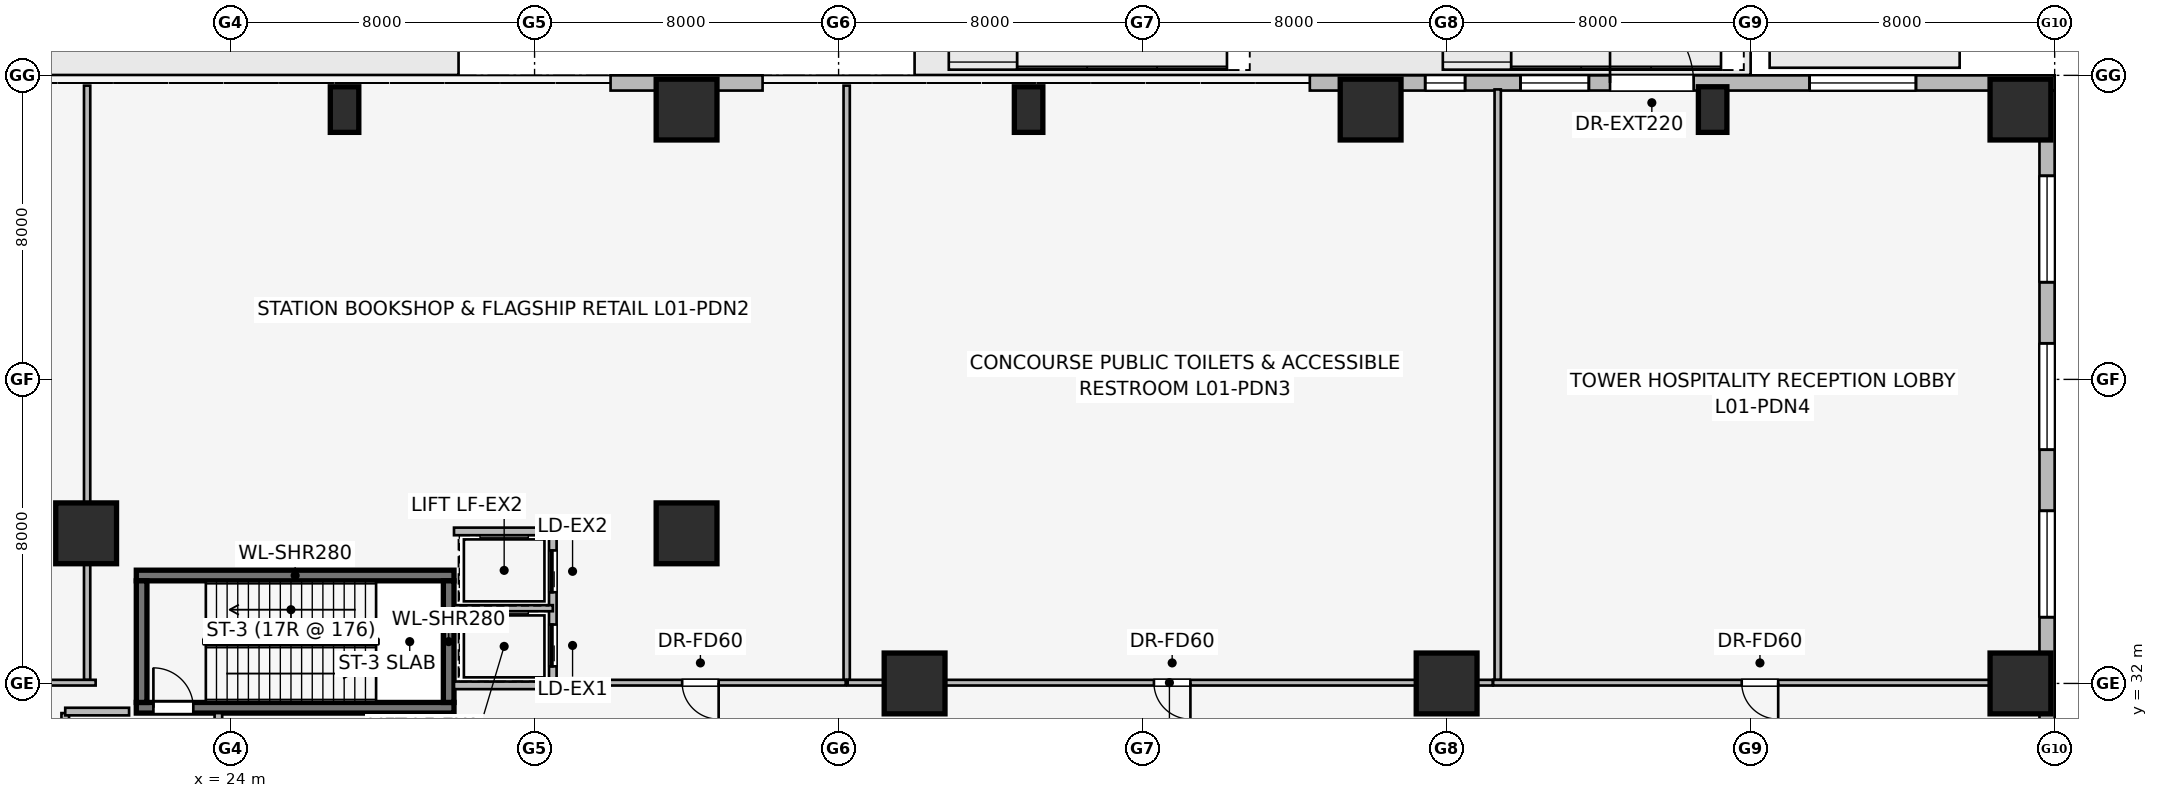
"""IFC4 building model, lengths in metres.
Left out: names, types, materials, properties, quantities, classifications, styles, units other than length and angle.
Written with IfcOpenShell. Run it as: python <this file> out.ifc"""

import sys

from ifc_helpers import new_model, si_unit, direction, frame, frame_2d, origin, origin_2d, place, context, subcontext, project, spatial, rectangle, extrude, element, fill, save


model = new_model("IFC4")
c1 = context("Model", 3, precision=1e-05, world=origin(), true_north=direction((0.0, 1.0)))
c2 = subcontext(c1, "Body", "Model", "MODEL_VIEW")
j1 = project(units=[si_unit("LENGTHUNIT", "METRE"), si_unit("PLANEANGLEUNIT", "RADIAN")], contexts=[c1])
p1 = place(None, origin())
s1 = spatial("IfcSite", under=j1, at=p1, CompositionType="ELEMENT")
p2 = place(p1, origin())
s2 = spatial("IfcBuilding", under=s1, at=p2, CompositionType="ELEMENT")
p3 = place(p2, origin())
s3 = spatial("IfcBuildingStorey", under=s2, at=p3, CompositionType="ELEMENT", Elevation=0.0)
p4 = place(p3, frame((21.52, 31.36, 0.0), z_axis=(0.0, 0.0, 1.0), x_axis=(1.0, 0.0, 0.0)))
e1 = element("IfcWall", 1, at=p4, inside=s3, PredefinedType="SHEAR", context=c2, shape_type="SweptSolid", body=[
    extrude(rectangle(XDim=8.36, YDim=0.28, at=frame_2d((4.18, 0.0))), origin(), (0.0, 0.0, 1.0), 6.0),
])
p5 = place(p4, frame((0.45, 0.0, 0.0)))
e2 = element("IfcOpeningElement", 2, at=p5, cuts=e1, PredefinedType="OPENING", context=c2, shape_type="SweptSolid", body=[
    extrude(rectangle(XDim=1.05, YDim=2.0, at=frame_2d((0.525, 1.0))), frame((0.0, 0.15, 0.0), z_axis=(0.0, -1.0, 0.0), x_axis=(1.0, 0.0, 0.0)), (0.0, 0.0, 1.0), 0.3),
])
p6 = place(p3, frame((29.88, 34.84, 0.0), z_axis=(0.0, 0.0, 1.0), x_axis=(-1.0, 0.0, 0.0)))
e3 = element("IfcWall", 3, at=p6, inside=s3, PredefinedType="SHEAR", context=c2, shape_type="SweptSolid", body=[
    extrude(rectangle(XDim=8.36, YDim=0.28, at=frame_2d((4.18, 0.0))), origin(), (0.0, 0.0, 1.0), 6.0),
])
for number, where, z_axis, x_axis in (
    (4, (21.66, 34.7, 0.0), (0.0, 0.0, 1.0), (0.0, -1.0, 0.0)),
    (5, (29.74, 31.5, 0.0), (0.0, 0.0, 1.0), (0.0, 1.0, 0.0)),
):
    element("IfcWall", number, at=place(p3, frame(where, z_axis=z_axis, x_axis=x_axis)), inside=s3, PredefinedType="SHEAR", context=c2, shape_type="SweptSolid", body=[
        extrude(rectangle(XDim=3.2, YDim=0.28, at=frame_2d((1.6, 0.0))), origin(), (0.0, 0.0, 1.0), 6.0),
    ])
for number, where, z_axis, x_axis in (
    (6, (71.1, 47.1, 0.0), (0.0, 0.0, 1.0), (1.0, 0.0, 0.0)),
    (7, (36.0, 47.1, 0.0), (0.0, 0.0, 1.0), (1.0, 0.0, 0.0)),
    (8, (54.0, 47.1, 0.0), (0.0, 0.0, 1.0), (1.0, 0.0, 0.0)),
    (9, (71.1, 32.0, 0.0), (0.0, 0.0, 1.0), (1.0, 0.0, 0.0)),
    (10, (42.0, 32.0, 0.0), (0.0, 0.0, 1.0), (1.0, 0.0, 0.0)),
    (11, (56.0, 32.0, 0.0), (0.0, 0.0, 1.0), (1.0, 0.0, 0.0)),
    (12, (20.2, 35.95, 0.0), (0.0, 0.0, 1.0), (1.0, 0.0, 0.0)),
    (13, (36.0, 35.95, 0.0), (0.0, 0.0, 1.0), (1.0, 0.0, 0.0)),
):
    element("IfcColumn", number, at=place(p3, frame(where, z_axis=z_axis, x_axis=x_axis)), inside=s3, PredefinedType="COLUMN", context=c2, shape_type="SweptSolid", body=[
        extrude(rectangle(XDim=1.6, YDim=1.6, at=origin_2d()), origin(), (0.0, 0.0, 1.0), 6.0),
    ])
for number, where, z_axis, x_axis in (
    (14, (27.0, 47.1, 0.0), (0.0, 0.0, 1.0), (1.0, 0.0, 0.0)),
    (15, (45.0, 47.1, 0.0), (0.0, 0.0, 1.0), (1.0, 0.0, 0.0)),
    (16, (63.0, 47.1, 0.0), (0.0, 0.0, 1.0), (1.0, 0.0, 0.0)),
):
    element("IfcColumn", number, at=place(p3, frame(where, z_axis=z_axis, x_axis=x_axis)), inside=s3, PredefinedType="PILASTER", context=c2, shape_type="SweptSolid", body=[
        extrude(rectangle(XDim=0.75, YDim=1.2, at=origin_2d()), origin(), (0.0, 0.0, 1.0), 6.0),
    ])
p7 = place(p3, frame((34.0, 47.8, 0.0), z_axis=(0.0, 0.0, 1.0), x_axis=(1.0, 0.0, 0.0)))
e17 = element("IfcWall", 17, at=p7, inside=s3, PredefinedType="STANDARD", context=c2, shape_type="SweptSolid", body=[
    extrude(rectangle(XDim=4.0, YDim=0.4, at=frame_2d((2.0, 0.0))), origin(), (0.0, 0.0, 1.0), 5.69),
])
p8 = place(p3, frame((52.4, 47.8, 0.0), z_axis=(0.0, 0.0, 1.0), x_axis=(1.0, 0.0, 0.0)))
e18 = element("IfcWall", 18, at=p8, inside=s3, PredefinedType="STANDARD", context=c2, shape_type="SweptSolid", body=[
    extrude(rectangle(XDim=19.6, YDim=0.4, at=frame_2d((9.8, 0.0))), origin(), (0.0, 0.0, 1.0), 5.69),
])
p9 = place(p8, frame((7.9, 0.0, 0.0)))
e19 = element("IfcOpeningElement", 19, at=p9, cuts=e18, PredefinedType="OPENING", context=c2, shape_type="SweptSolid", body=[
    extrude(rectangle(XDim=2.2, YDim=2.6, at=frame_2d((1.1, 1.3))), frame((0.0, 0.21, 0.0), z_axis=(0.0, -1.0, 0.0), x_axis=(1.0, 0.0, 0.0)), (0.0, 0.0, 1.0), 0.42),
])
p10 = place(p8, frame((3.036, 0.0, 0.75)))
e20 = element("IfcOpeningElement", 20, at=p10, cuts=e18, PredefinedType="OPENING", context=c2, shape_type="SweptSolid", body=[
    extrude(rectangle(XDim=1.05, YDim=1.4, at=frame_2d((0.525, 0.7))), frame((0.0, 0.21, 0.0), z_axis=(0.0, -1.0, 0.0), x_axis=(1.0, 0.0, 0.0)), (0.0, 0.0, 1.0), 0.42),
])
p11 = place(p8, frame((5.543, 0.0, 0.75)))
e21 = element("IfcOpeningElement", 21, at=p11, cuts=e18, PredefinedType="OPENING", context=c2, shape_type="SweptSolid", body=[
    extrude(rectangle(XDim=1.8, YDim=1.5, at=frame_2d((0.9, 0.75))), frame((0.0, 0.21, 0.0), z_axis=(0.0, -1.0, 0.0), x_axis=(1.0, 0.0, 0.0)), (0.0, 0.0, 1.0), 0.42),
])
p12 = place(p8, frame((13.15, 0.0, 0.75)))
e22 = element("IfcOpeningElement", 22, at=p12, cuts=e18, PredefinedType="OPENING", context=c2, shape_type="SweptSolid", body=[
    extrude(rectangle(XDim=2.8, YDim=1.8, at=frame_2d((1.4, 0.9))), frame((0.0, 0.21, 0.0), z_axis=(0.0, -1.0, 0.0), x_axis=(1.0, 0.0, 0.0)), (0.0, 0.0, 1.0), 0.42),
])
p13 = place(p3, frame((71.8, 47.6, 0.0), z_axis=(0.0, 0.0, 1.0), x_axis=(0.0, -1.0, 0.0)))
e23 = element("IfcWall", 23, at=p13, inside=s3, PredefinedType="STANDARD", context=c2, shape_type="SweptSolid", body=[
    extrude(rectangle(XDim=23.6, YDim=0.4, at=frame_2d((11.8, 0.0))), origin(), (0.0, 0.0, 1.0), 5.69),
])
p14 = place(p13, frame((16.6, 0.0, 0.0)))
e24 = element("IfcOpeningElement", 24, at=p14, cuts=e23, PredefinedType="OPENING", context=c2, shape_type="SweptSolid", body=[
    extrude(rectangle(XDim=3.6, YDim=3.6, at=frame_2d((1.8, 1.8))), frame((0.0, 0.21, 0.0), z_axis=(0.0, -1.0, 0.0), x_axis=(1.0, 0.0, 0.0)), (0.0, 0.0, 1.0), 0.42),
])
p15 = place(p13, frame((2.243, 0.0, 0.75)))
e25 = element("IfcOpeningElement", 25, at=p15, cuts=e23, PredefinedType="OPENING", context=c2, shape_type="SweptSolid", body=[
    extrude(rectangle(XDim=2.8, YDim=1.8, at=frame_2d((1.4, 0.9))), frame((0.0, 0.21, 0.0), z_axis=(0.0, -1.0, 0.0), x_axis=(1.0, 0.0, 0.0)), (0.0, 0.0, 1.0), 0.42),
])
p16 = place(p13, frame((6.65, 0.0, 0.75)))
e26 = element("IfcOpeningElement", 26, at=p16, cuts=e23, PredefinedType="OPENING", context=c2, shape_type="SweptSolid", body=[
    extrude(rectangle(XDim=2.8, YDim=1.8, at=frame_2d((1.4, 0.9))), frame((0.0, 0.21, 0.0), z_axis=(0.0, -1.0, 0.0), x_axis=(1.0, 0.0, 0.0)), (0.0, 0.0, 1.0), 0.42),
])
p17 = place(p13, frame((11.057, 0.0, 0.75)))
e27 = element("IfcOpeningElement", 27, at=p17, cuts=e23, PredefinedType="OPENING", context=c2, shape_type="SweptSolid", body=[
    extrude(rectangle(XDim=2.8, YDim=1.8, at=frame_2d((1.4, 0.9))), frame((0.0, 0.21, 0.0), z_axis=(0.0, -1.0, 0.0), x_axis=(1.0, 0.0, 0.0)), (0.0, 0.0, 1.0), 0.42),
])
p18 = place(p13, frame((20.885, 0.0, 0.75)))
e28 = element("IfcOpeningElement", 28, at=p18, cuts=e23, PredefinedType="OPENING", context=c2, shape_type="SweptSolid", body=[
    extrude(rectangle(XDim=1.8, YDim=1.5, at=frame_2d((0.9, 0.75))), frame((0.0, 0.21, 0.0), z_axis=(0.0, -1.0, 0.0), x_axis=(1.0, 0.0, 0.0)), (0.0, 0.0, 1.0), 0.42),
])
p19 = place(p3, frame((19.65, 25.68, 0.0), z_axis=(0.0, 0.0, 1.0), x_axis=(0.0, 1.0, 0.0)))
e29 = element("IfcWall", 29, at=p19, inside=s3, PredefinedType="PARTITIONING", context=c2, shape_type="SweptSolid", body=[
    extrude(rectangle(XDim=5.54, YDim=0.2, at=frame_2d((2.77, 0.0))), origin(), (0.0, 0.0, 1.0), 5.69),
])
p20 = place(p19, frame((0.62, 0.0, 0.0)))
e30 = element("IfcOpeningElement", 30, at=p20, cuts=e29, PredefinedType="OPENING", context=c2, shape_type="SweptSolid", body=[
    extrude(rectangle(XDim=1.1, YDim=2.2, at=frame_2d((0.55, 1.1))), frame((0.0, 0.11, 0.0), z_axis=(0.0, -1.0, 0.0), x_axis=(1.0, 0.0, 0.0)), (0.0, 0.0, 1.0), 0.22),
])
p21 = place(p19, frame((3.12, 0.0, 0.0)))
e31 = element("IfcOpeningElement", 31, at=p21, cuts=e29, PredefinedType="OPENING", context=c2, shape_type="SweptSolid", body=[
    extrude(rectangle(XDim=1.1, YDim=2.2, at=frame_2d((0.55, 1.1))), frame((0.0, 0.11, 0.0), z_axis=(0.0, -1.0, 0.0), x_axis=(1.0, 0.0, 0.0)), (0.0, 0.0, 1.0), 0.22),
])
p22 = place(p3, frame((23.68, 25.68, 0.0), z_axis=(0.0, 0.0, 1.0), x_axis=(0.0, 1.0, 0.0)))
e32 = element("IfcWall", 32, at=p22, inside=s3, PredefinedType="PARTITIONING", context=c2, shape_type="SweptSolid", body=[
    extrude(rectangle(XDim=5.54, YDim=0.2, at=frame_2d((2.77, 0.0))), origin(), (0.0, 0.0, 1.0), 5.69),
])
p23 = place(p22, frame((1.8, 0.0, 0.0)))
e33 = element("IfcOpeningElement", 33, at=p23, cuts=e32, PredefinedType="OPENING", context=c2, shape_type="SweptSolid", body=[
    extrude(rectangle(XDim=1.05, YDim=2.0, at=frame_2d((0.525, 1.0))), frame((0.0, 0.11, 0.0), z_axis=(0.0, -1.0, 0.0), x_axis=(1.0, 0.0, 0.0)), (0.0, 0.0, 1.0), 0.22),
])
p24 = place(p3, frame((21.33, 31.26, 0.0), z_axis=(0.0, 0.0, 1.0), x_axis=(-1.0, 0.0, 0.0)))
e34 = element("IfcWall", 34, at=p24, inside=s3, PredefinedType="PARTITIONING", context=c2, shape_type="SweptSolid", body=[
    extrude(rectangle(XDim=1.68, YDim=0.2, at=frame_2d((0.84, 0.0))), origin(), (0.0, 0.0, 1.0), 5.69),
])
p25 = place(p3, frame((32.48, 31.95, 0.0), z_axis=(0.0, 0.0, 1.0), x_axis=(0.0, 1.0, 0.0)))
e35 = element("IfcWall", 35, at=p25, inside=s3, PredefinedType="PARTITIONING", context=c2, shape_type="SweptSolid", body=[
    extrude(rectangle(XDim=4.05, YDim=0.2, at=frame_2d((2.025, 0.0))), origin(), (0.0, 0.0, 1.0), 5.69),
])
p26 = place(p25, frame((0.5, 0.0, 0.0)))
e36 = element("IfcOpeningElement", 36, at=p26, cuts=e35, PredefinedType="OPENING", context=c2, shape_type="SweptSolid", body=[
    extrude(rectangle(XDim=1.1, YDim=2.2, at=frame_2d((0.55, 1.1))), frame((0.0, 0.11, 0.0), z_axis=(0.0, -1.0, 0.0), x_axis=(1.0, 0.0, 0.0)), (0.0, 0.0, 1.0), 0.22),
])
p27 = place(p25, frame((2.45, 0.0, 0.0)))
e37 = element("IfcOpeningElement", 37, at=p27, cuts=e35, PredefinedType="OPENING", context=c2, shape_type="SweptSolid", body=[
    extrude(rectangle(XDim=1.1, YDim=2.2, at=frame_2d((0.55, 1.1))), frame((0.0, 0.11, 0.0), z_axis=(0.0, -1.0, 0.0), x_axis=(1.0, 0.0, 0.0)), (0.0, 0.0, 1.0), 0.22),
])
p28 = place(p3, frame((29.88, 36.0, 0.0), z_axis=(0.0, 0.0, 1.0), x_axis=(1.0, 0.0, 0.0)))
e38 = element("IfcWall", 38, at=p28, inside=s3, PredefinedType="PARTITIONING", context=c2, shape_type="SweptSolid", body=[
    extrude(rectangle(XDim=2.6, YDim=0.2, at=frame_2d((1.3, 0.0))), origin(), (0.0, 0.0, 1.0), 4.742),
])
p29 = place(p3, frame((32.48, 31.95, 0.0), z_axis=(0.0, 0.0, 1.0), x_axis=(-1.0, 0.0, 0.0)))
e39 = element("IfcWall", 39, at=p29, inside=s3, PredefinedType="PARTITIONING", context=c2, shape_type="SweptSolid", body=[
    extrude(rectangle(XDim=2.6, YDim=0.2, at=frame_2d((1.3, 0.0))), origin(), (0.0, 0.0, 1.0), 5.69),
])
p30 = place(p3, frame((29.875, 33.98, 0.0), z_axis=(0.0, 0.0, 1.0), x_axis=(1.0, 0.0, 0.0)))
e40 = element("IfcWall", 40, at=p30, inside=s3, PredefinedType="PARTITIONING", context=c2, shape_type="SweptSolid", body=[
    extrude(rectangle(XDim=2.605, YDim=0.16, at=frame_2d((1.302, 0.0))), origin(), (0.0, 0.0, 1.0), 5.69),
])
p31 = place(p3, frame((20.226, 32.09, 0.0), z_axis=(0.0, 0.0, 1.0), x_axis=(0.0, 1.0, 0.0)))
e41 = element("IfcWall", 41, at=p31, inside=s3, PredefinedType="PARTITIONING", context=c2, shape_type="SweptSolid", body=[
    extrude(rectangle(XDim=15.64, YDim=0.165, at=frame_2d((7.82, 0.0))), origin(), (0.0, 0.0, 1.0), 5.69),
])
p32 = place(p3, frame((40.213, 32.09, 0.0), z_axis=(0.0, 0.0, 1.0), x_axis=(0.0, 1.0, 0.0)))
e42 = element("IfcWall", 42, at=p32, inside=s3, PredefinedType="PARTITIONING", context=c2, shape_type="SweptSolid", body=[
    extrude(rectangle(XDim=15.64, YDim=0.165, at=frame_2d((7.82, 0.0))), origin(), (0.0, 0.0, 1.0), 5.082),
])
p33 = place(p3, frame((57.344, 32.09, 0.0), z_axis=(0.0, 0.0, 1.0), x_axis=(0.0, 1.0, 0.0)))
e43 = element("IfcWall", 43, at=p33, inside=s3, PredefinedType="PARTITIONING", context=c2, shape_type="SweptSolid", body=[
    extrude(rectangle(XDim=15.54, YDim=0.165, at=frame_2d((7.77, 0.0))), origin(), (0.0, 0.0, 1.0), 5.69),
])
p34 = place(p3, frame((20.45, 32.02, 0.0), z_axis=(0.0, 0.0, 1.0), x_axis=(-1.0, 0.0, 0.0)))
e44 = element("IfcWall", 44, at=p34, inside=s3, PredefinedType="PARTITIONING", context=c2, shape_type="SweptSolid", body=[
    extrude(rectangle(XDim=20.055, YDim=0.15, at=frame_2d((10.027, 0.0))), origin(), (0.0, 0.0, 1.0), 4.742),
])
p35 = place(p34, frame((9.5, 0.0, 0.0)))
e45 = element("IfcOpeningElement", 45, at=p35, cuts=e44, PredefinedType="OPENING", context=c2, shape_type="SweptSolid", body=[
    extrude(rectangle(XDim=0.96, YDim=2.0, at=frame_2d((0.48, 1.0))), frame((0.0, 0.085, 0.0), z_axis=(0.0, -1.0, 0.0), x_axis=(1.0, 0.0, 0.0)), (0.0, 0.0, 1.0), 0.17),
])
p36 = place(p3, frame((40.187, 32.02, 0.0), z_axis=(0.0, 0.0, 1.0), x_axis=(-1.0, 0.0, 0.0)))
e46 = element("IfcWall", 46, at=p36, inside=s3, PredefinedType="PARTITIONING", context=c2, shape_type="SweptSolid", body=[
    extrude(rectangle(XDim=7.646, YDim=0.15, at=frame_2d((3.823, 0.0))), origin(), (0.0, 0.0, 1.0), 5.69),
])
p37 = place(p36, frame((3.343, 0.0, 0.0)))
e47 = element("IfcOpeningElement", 47, at=p37, cuts=e46, PredefinedType="OPENING", context=c2, shape_type="SweptSolid", body=[
    extrude(rectangle(XDim=0.96, YDim=2.0, at=frame_2d((0.48, 1.0))), frame((0.0, 0.085, 0.0), z_axis=(0.0, -1.0, 0.0), x_axis=(1.0, 0.0, 0.0)), (0.0, 0.0, 1.0), 0.17),
])
p38 = place(p3, frame((57.214, 32.02, 0.0), z_axis=(0.0, 0.0, 1.0), x_axis=(-1.0, 0.0, 0.0)))
e48 = element("IfcWall", 48, at=p38, inside=s3, PredefinedType="PARTITIONING", context=c2, shape_type="SweptSolid", body=[
    extrude(rectangle(XDim=16.975, YDim=0.15, at=frame_2d((8.488, 0.0))), origin(), (0.0, 0.0, 1.0), 4.742),
])
p39 = place(p38, frame((7.956, 0.0, 0.0)))
e49 = element("IfcOpeningElement", 49, at=p39, cuts=e48, PredefinedType="OPENING", context=c2, shape_type="SweptSolid", body=[
    extrude(rectangle(XDim=0.96, YDim=2.0, at=frame_2d((0.48, 1.0))), frame((0.0, 0.085, 0.0), z_axis=(0.0, -1.0, 0.0), x_axis=(1.0, 0.0, 0.0)), (0.0, 0.0, 1.0), 0.17),
])
p40 = place(p3, frame((71.605, 32.02, 0.0), z_axis=(0.0, 0.0, 1.0), x_axis=(-1.0, 0.0, 0.0)))
e50 = element("IfcWall", 50, at=p40, inside=s3, PredefinedType="PARTITIONING", context=c2, shape_type="SweptSolid", body=[
    extrude(rectangle(XDim=14.381, YDim=0.15, at=frame_2d((7.19, 0.0))), origin(), (0.0, 0.0, 1.0), 4.742),
])
p41 = place(p40, frame((6.88, 0.0, 0.0)))
e51 = element("IfcOpeningElement", 51, at=p41, cuts=e50, PredefinedType="OPENING", context=c2, shape_type="SweptSolid", body=[
    extrude(rectangle(XDim=0.96, YDim=2.0, at=frame_2d((0.48, 1.0))), frame((0.0, 0.085, 0.0), z_axis=(0.0, -1.0, 0.0), x_axis=(1.0, 0.0, 0.0)), (0.0, 0.0, 1.0), 0.17),
])
p42 = place(p9, origin())
e52 = element("IfcDoor", 52, at=p42, inside=s3, OperationType="SINGLE_SWING_LEFT", PredefinedType="DOOR", context=c2, shape_type="SweptSolid", body=[
    extrude(rectangle(XDim=2.2, YDim=2.6, at=frame_2d((1.1, 1.3))), frame((0.0, 0.025, 0.0), z_axis=(0.0, -1.0, 0.0), x_axis=(1.0, 0.0, 0.0)), (0.0, 0.0, 1.0), 0.05),
])
fill(e19, e52)
p43 = place(p10, origin())
e53 = element("IfcWindow", 53, at=p43, inside=s3, PartitioningType="SINGLE_PANEL", PredefinedType="WINDOW", context=c2, shape_type="SweptSolid", body=[
    extrude(rectangle(XDim=1.05, YDim=1.4, at=frame_2d((0.525, 0.7))), frame((0.0, 0.03, 0.0), z_axis=(0.0, -1.0, 0.0), x_axis=(1.0, 0.0, 0.0)), (0.0, 0.0, 1.0), 0.06),
])
fill(e20, e53)
p44 = place(p11, origin())
e54 = element("IfcWindow", 54, at=p44, inside=s3, PartitioningType="SINGLE_PANEL", PredefinedType="WINDOW", context=c2, shape_type="SweptSolid", body=[
    extrude(rectangle(XDim=1.8, YDim=1.5, at=frame_2d((0.9, 0.75))), frame((0.0, 0.03, 0.0), z_axis=(0.0, -1.0, 0.0), x_axis=(1.0, 0.0, 0.0)), (0.0, 0.0, 1.0), 0.06),
])
fill(e21, e54)
p45 = place(p12, origin())
e55 = element("IfcWindow", 55, at=p45, inside=s3, PartitioningType="SINGLE_PANEL", PredefinedType="WINDOW", context=c2, shape_type="SweptSolid", body=[
    extrude(rectangle(XDim=2.8, YDim=1.8, at=frame_2d((1.4, 0.9))), frame((0.0, 0.03, 0.0), z_axis=(0.0, -1.0, 0.0), x_axis=(1.0, 0.0, 0.0)), (0.0, 0.0, 1.0), 0.06),
])
fill(e22, e55)
p46 = place(p15, origin())
e56 = element("IfcWindow", 56, at=p46, inside=s3, PartitioningType="SINGLE_PANEL", PredefinedType="WINDOW", context=c2, shape_type="SweptSolid", body=[
    extrude(rectangle(XDim=2.8, YDim=1.8, at=frame_2d((1.4, 0.9))), frame((0.0, 0.03, 0.0), z_axis=(0.0, -1.0, 0.0), x_axis=(1.0, 0.0, 0.0)), (0.0, 0.0, 1.0), 0.06),
])
fill(e25, e56)
p47 = place(p16, origin())
e57 = element("IfcWindow", 57, at=p47, inside=s3, PartitioningType="SINGLE_PANEL", PredefinedType="WINDOW", context=c2, shape_type="SweptSolid", body=[
    extrude(rectangle(XDim=2.8, YDim=1.8, at=frame_2d((1.4, 0.9))), frame((0.0, 0.03, 0.0), z_axis=(0.0, -1.0, 0.0), x_axis=(1.0, 0.0, 0.0)), (0.0, 0.0, 1.0), 0.06),
])
fill(e26, e57)
p48 = place(p17, origin())
e58 = element("IfcWindow", 58, at=p48, inside=s3, PartitioningType="SINGLE_PANEL", PredefinedType="WINDOW", context=c2, shape_type="SweptSolid", body=[
    extrude(rectangle(XDim=2.8, YDim=1.8, at=frame_2d((1.4, 0.9))), frame((0.0, 0.03, 0.0), z_axis=(0.0, -1.0, 0.0), x_axis=(1.0, 0.0, 0.0)), (0.0, 0.0, 1.0), 0.06),
])
fill(e27, e58)
p49 = place(p5, origin())
e59 = element("IfcDoor", 59, at=p49, inside=s3, OperationType="SINGLE_SWING_LEFT", PredefinedType="DOOR", context=c2, shape_type="SweptSolid", body=[
    extrude(rectangle(XDim=1.05, YDim=2.0, at=frame_2d((0.525, 1.0))), frame((0.0, 0.025, 0.0), z_axis=(0.0, -1.0, 0.0), x_axis=(1.0, 0.0, 0.0)), (0.0, 0.0, 1.0), 0.05),
])
fill(e2, e59)
p50 = place(p26, origin())
e60 = element("IfcDoor", 60, at=p50, inside=s3, OperationType="SLIDING_TO_LEFT", PredefinedType="DOOR", context=c2, shape_type="SweptSolid", body=[
    extrude(rectangle(XDim=1.1, YDim=2.2, at=frame_2d((0.55, 1.1))), frame((0.0, 0.025, 0.0), z_axis=(0.0, -1.0, 0.0), x_axis=(1.0, 0.0, 0.0)), (0.0, 0.0, 1.0), 0.05),
])
fill(e36, e60)
p51 = place(p27, origin())
e61 = element("IfcDoor", 61, at=p51, inside=s3, OperationType="SLIDING_TO_LEFT", PredefinedType="DOOR", context=c2, shape_type="SweptSolid", body=[
    extrude(rectangle(XDim=1.1, YDim=2.2, at=frame_2d((0.55, 1.1))), frame((0.0, 0.025, 0.0), z_axis=(0.0, -1.0, 0.0), x_axis=(1.0, 0.0, 0.0)), (0.0, 0.0, 1.0), 0.05),
])
fill(e37, e61)
p52 = place(p37, origin())
e62 = element("IfcDoor", 62, at=p52, inside=s3, OperationType="SINGLE_SWING_LEFT", PredefinedType="DOOR", context=c2, shape_type="SweptSolid", body=[
    extrude(rectangle(XDim=0.96, YDim=2.0, at=frame_2d((0.48, 1.0))), frame((0.0, 0.025, 0.0), z_axis=(0.0, -1.0, 0.0), x_axis=(1.0, 0.0, 0.0)), (0.0, 0.0, 1.0), 0.05),
])
fill(e47, e62)
p53 = place(p39, origin())
e63 = element("IfcDoor", 63, at=p53, inside=s3, OperationType="SINGLE_SWING_LEFT", PredefinedType="DOOR", context=c2, shape_type="SweptSolid", body=[
    extrude(rectangle(XDim=0.96, YDim=2.0, at=frame_2d((0.48, 1.0))), frame((0.0, 0.025, 0.0), z_axis=(0.0, -1.0, 0.0), x_axis=(1.0, 0.0, 0.0)), (0.0, 0.0, 1.0), 0.05),
])
fill(e49, e63)
p54 = place(p41, origin())
e64 = element("IfcDoor", 64, at=p54, inside=s3, OperationType="SINGLE_SWING_LEFT", PredefinedType="DOOR", context=c2, shape_type="SweptSolid", body=[
    extrude(rectangle(XDim=0.96, YDim=2.0, at=frame_2d((0.48, 1.0))), frame((0.0, 0.025, 0.0), z_axis=(0.0, -1.0, 0.0), x_axis=(1.0, 0.0, 0.0)), (0.0, 0.0, 1.0), 0.05),
])
fill(e51, e64)
save(model, sys.argv[1])
